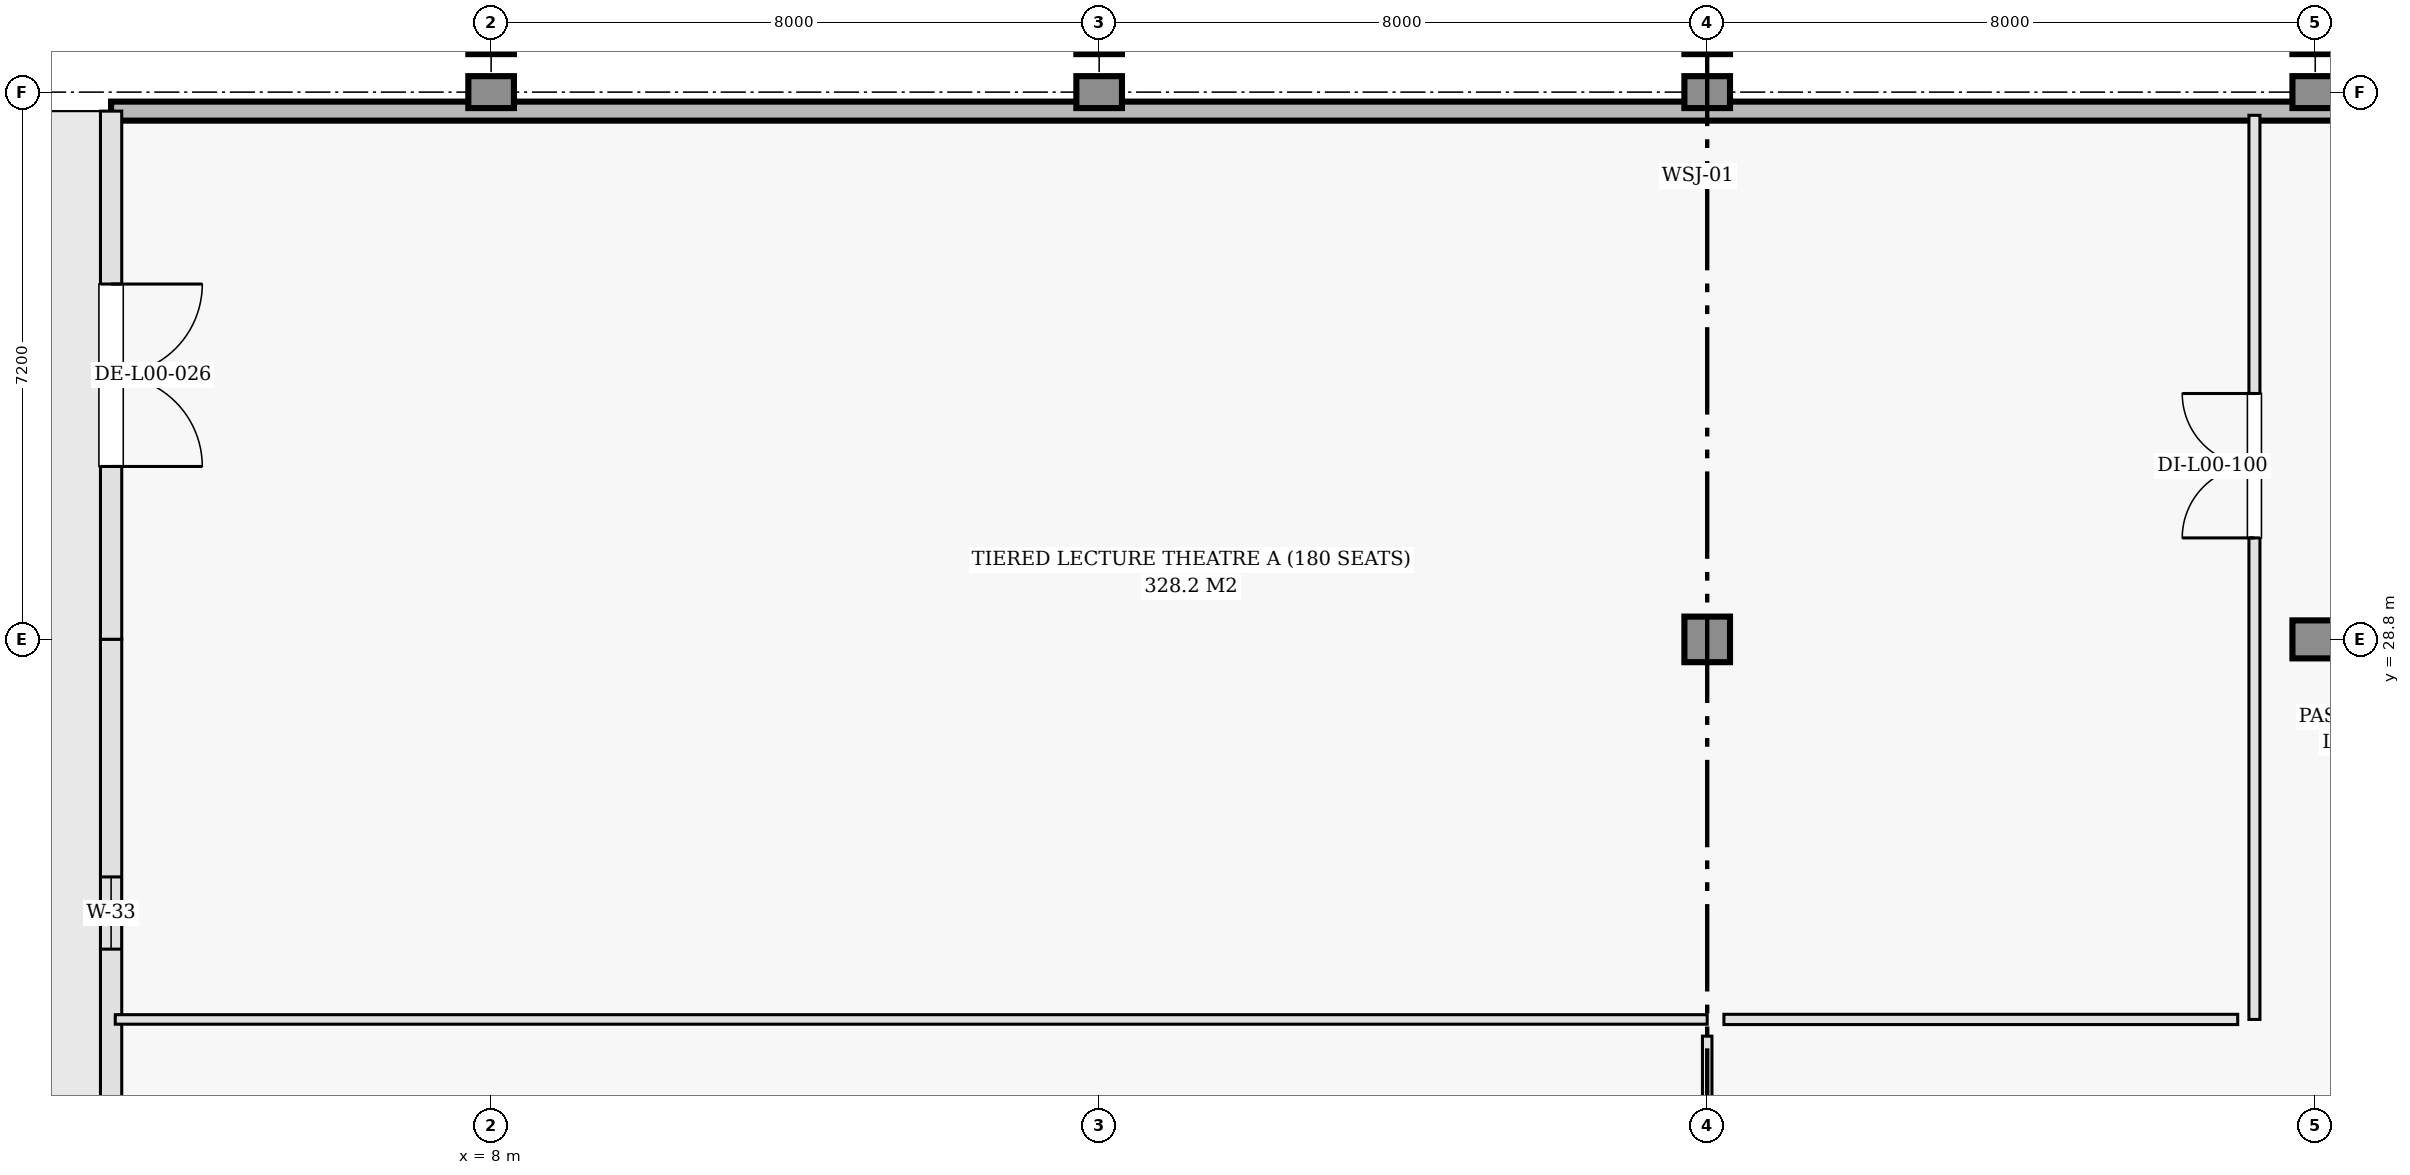
"""IFC4 building model, lengths in metres.
Left out: names, types, materials, properties, quantities, classifications, styles, units other than length and angle.
Written with IfcOpenShell. Run it as: python <this file> out.ifc"""

import sys

from ifc_helpers import new_model, si_unit, direction, frame, frame_2d, origin, origin_2d, place, context, subcontext, project, spatial, rectangle, extrude, element, fill, save


model = new_model("IFC4")
c1 = context("Model", 3, precision=1e-05, world=origin(), true_north=direction((0.0, 1.0)))
c2 = subcontext(c1, "Body", "Model", "MODEL_VIEW")
j1 = project(units=[si_unit("LENGTHUNIT", "METRE"), si_unit("PLANEANGLEUNIT", "RADIAN")], contexts=[c1])
p1 = place(None, origin())
s1 = spatial("IfcSite", under=j1, at=p1, CompositionType="ELEMENT")
p2 = place(p1, origin())
s2 = spatial("IfcBuilding", under=s1, at=p2, CompositionType="ELEMENT")
p3 = place(p2, origin())
s3 = spatial("IfcBuildingStorey", under=s2, at=p3, CompositionType="ELEMENT", Elevation=0.0)
for number, where, z_axis, x_axis in (
    (1, (8.0, 36.0, 0.0), (0.0, 0.0, 1.0), (1.0, 0.0, 0.0)),
    (2, (16.0, 36.0, 0.0), (0.0, 0.0, 1.0), (1.0, 0.0, 0.0)),
):
    element("IfcColumn", number, at=place(p3, frame(where, z_axis=z_axis, x_axis=x_axis)), inside=s3, PredefinedType="COLUMN", context=c2, shape_type="SweptSolid", body=[
        extrude(rectangle(XDim=0.42, YDim=0.42, at=origin_2d()), origin(), (0.0, 0.0, 1.0), 4.8),
    ])
p4 = place(p3, frame((24.0, 28.8, 0.0), z_axis=(0.0, 0.0, 1.0), x_axis=(1.0, 0.0, 0.0)))
e3 = element("IfcColumn", 3, at=p4, inside=s3, PredefinedType="COLUMN", context=c2, shape_type="SweptSolid", body=[
    extrude(rectangle(XDim=0.6, YDim=0.6, at=origin_2d()), origin(), (0.0, 0.0, 1.0), 4.8),
])
p5 = place(p3, frame((24.0, 36.0, 0.0), z_axis=(0.0, 0.0, 1.0), x_axis=(1.0, 0.0, 0.0)))
e4 = element("IfcColumn", 4, at=p5, inside=s3, PredefinedType="COLUMN", context=c2, shape_type="SweptSolid", body=[
    extrude(rectangle(XDim=0.42, YDim=0.42, at=origin_2d()), origin(), (0.0, 0.0, 1.0), 4.8),
])
p6 = place(p3, frame((32.0, 28.8, 0.0), z_axis=(0.0, 0.0, 1.0), x_axis=(1.0, 0.0, 0.0)))
e5 = element("IfcColumn", 5, at=p6, inside=s3, PredefinedType="COLUMN", context=c2, shape_type="SweptSolid", body=[
    extrude(rectangle(XDim=0.5, YDim=0.5, at=origin_2d()), origin(), (0.0, 0.0, 1.0), 4.8),
])
p7 = place(p3, frame((32.0, 36.0, 0.0), z_axis=(0.0, 0.0, 1.0), x_axis=(1.0, 0.0, 0.0)))
e6 = element("IfcColumn", 6, at=p7, inside=s3, PredefinedType="COLUMN", context=c2, shape_type="SweptSolid", body=[
    extrude(rectangle(XDim=0.42, YDim=0.42, at=origin_2d()), origin(), (0.0, 0.0, 1.0), 4.8),
])
for number, where, z_axis, x_axis in (
    (7, (8.0, 36.75, 0.0), (0.0, 0.0, 1.0), (1.0, 0.0, 0.0)),
    (8, (16.0, 36.75, 0.0), (0.0, 0.0, 1.0), (1.0, 0.0, 0.0)),
    (9, (24.0, 36.75, 0.0), (0.0, 0.0, 1.0), (1.0, 0.0, 0.0)),
    (10, (32.0, 36.75, 0.0), (0.0, 0.0, 1.0), (1.0, 0.0, 0.0)),
):
    element("IfcColumn", number, at=place(p3, frame(where, z_axis=z_axis, x_axis=x_axis)), inside=s3, PredefinedType="COLUMN", context=c2, shape_type="SweptSolid", body=[
        extrude(rectangle(XDim=0.5, YDim=0.5, at=origin_2d()), origin(), (0.0, 0.0, 1.0), 4.8),
    ])
p8 = place(p3, frame((44.75, 35.75, 0.0), z_axis=(0.0, 0.0, 1.0), x_axis=(-1.0, 0.0, 0.0)))
e11 = element("IfcWall", 11, at=p8, inside=s3, PredefinedType="SHEAR", context=c2, shape_type="SweptSolid", body=[
    extrude(rectangle(XDim=41.75, YDim=0.25, at=frame_2d((20.875, 0.0))), origin(), (0.0, 0.0, 1.0), 4.52),
])
p9 = place(p3, frame((3.0, 35.75, 0.0), z_axis=(0.0, 0.0, 1.0), x_axis=(0.0, -1.0, 0.0)))
e12 = element("IfcWall", 12, at=p9, inside=s3, PredefinedType="SOLIDWALL", context=c2, shape_type="SweptSolid", body=[
    extrude(rectangle(XDim=6.95, YDim=0.28, at=frame_2d((3.475, 0.0))), origin(), (0.0, 0.0, 1.0), 3.105),
])
p10 = place(p9, frame((2.275, 0.0, 0.0)))
e13 = element("IfcOpeningElement", 13, at=p10, cuts=e12, PredefinedType="OPENING", context=c2, shape_type="SweptSolid", body=[
    extrude(rectangle(XDim=2.4, YDim=2.4, at=frame_2d((1.2, 1.2))), frame((0.0, 0.15, 0.0), z_axis=(0.0, -1.0, 0.0), x_axis=(1.0, 0.0, 0.0)), (0.0, 0.0, 1.0), 0.3),
])
p11 = place(p3, frame((3.0, 28.8, 0.0), z_axis=(0.0, 0.0, 1.0), x_axis=(0.0, -1.0, 0.0)))
e14 = element("IfcWall", 14, at=p11, inside=s3, PredefinedType="SOLIDWALL", context=c2, shape_type="SweptSolid", body=[
    extrude(rectangle(XDim=7.2, YDim=0.28, at=frame_2d((3.6, 0.0))), origin(), (0.0, 0.0, 1.0), 3.105),
])
p12 = place(p11, frame((3.125, 0.0, 1.885)))
e15 = element("IfcOpeningElement", 15, at=p12, cuts=e14, PredefinedType="OPENING", context=c2, shape_type="SweptSolid", body=[
    extrude(rectangle(XDim=0.95, YDim=1.0, at=frame_2d((0.475, 0.5))), frame((0.0, 0.15, 0.0), z_axis=(0.0, -1.0, 0.0), x_axis=(1.0, 0.0, 0.0)), (0.0, 0.0, 1.0), 0.3),
])
p13 = place(p3, frame((3.055, 23.8, 0.0), z_axis=(0.0, 0.0, 1.0), x_axis=(1.0, 0.0, 0.0)))
e16 = element("IfcWall", 16, at=p13, inside=s3, PredefinedType="PARTITIONING", context=c2, shape_type="SweptSolid", body=[
    extrude(rectangle(XDim=20.945, YDim=0.125, at=frame_2d((10.473, 0.0))), origin(), (0.0, 0.0, 1.0), 3.955),
])
p14 = place(p3, frame((31.2, 23.8, 0.0), z_axis=(0.0, 0.0, 1.0), x_axis=(0.0, 1.0, 0.0)))
e17 = element("IfcWall", 17, at=p14, inside=s3, PredefinedType="PARTITIONING", context=c2, shape_type="SweptSolid", body=[
    extrude(rectangle(XDim=11.895, YDim=0.145, at=frame_2d((5.948, 0.0))), origin(), (0.0, 0.0, 1.0), 3.905),
])
p15 = place(p14, frame((6.335, 0.0, 0.0)))
e18 = element("IfcOpeningElement", 18, at=p15, cuts=e17, PredefinedType="OPENING", context=c2, shape_type="SweptSolid", body=[
    extrude(rectangle(XDim=1.9, YDim=2.25, at=frame_2d((0.95, 1.125))), frame((0.0, 0.083, 0.0), z_axis=(0.0, -1.0, 0.0), x_axis=(1.0, 0.0, 0.0)), (0.0, 0.0, 1.0), 0.165),
])
p16 = place(p3, frame((24.22, 23.8, 0.0), z_axis=(0.0, 0.0, 1.0), x_axis=(1.0, 0.0, 0.0)))
e19 = element("IfcWall", 19, at=p16, inside=s3, PredefinedType="PARTITIONING", context=c2, shape_type="SweptSolid", body=[
    extrude(rectangle(XDim=6.76, YDim=0.135, at=frame_2d((3.38, 0.0))), origin(), (0.0, 0.0, 1.0), 4.52),
])
p17 = place(p3, frame((24.0, 18.614, 0.0), z_axis=(0.0, 0.0, 1.0), x_axis=(0.0, 1.0, 0.0)))
e20 = element("IfcWall", 20, at=p17, inside=s3, PredefinedType="PARTITIONING", context=c2, shape_type="SweptSolid", body=[
    extrude(rectangle(XDim=4.966, YDim=0.125, at=frame_2d((2.483, 0.0))), origin(), (0.0, 0.0, 1.0), 3.955),
])
p18 = place(p10, origin())
e21 = element("IfcDoor", 21, at=p18, inside=s3, OperationType="DOUBLE_DOOR_SINGLE_SWING", PredefinedType="DOOR", context=c2, shape_type="SweptSolid", body=[
    extrude(rectangle(XDim=2.4, YDim=2.4, at=frame_2d((1.2, 1.2))), frame((0.0, 0.025, 0.0), z_axis=(0.0, -1.0, 0.0), x_axis=(1.0, 0.0, 0.0)), (0.0, 0.0, 1.0), 0.05),
])
fill(e13, e21)
p19 = place(p12, origin())
e22 = element("IfcWindow", 22, at=p19, inside=s3, PartitioningType="DOUBLE_PANEL_VERTICAL", PredefinedType="WINDOW", context=c2, shape_type="SweptSolid", body=[
    extrude(rectangle(XDim=0.95, YDim=1.0, at=frame_2d((0.475, 0.5))), frame((0.0, 0.03, 0.0), z_axis=(0.0, -1.0, 0.0), x_axis=(1.0, 0.0, 0.0)), (0.0, 0.0, 1.0), 0.06),
])
fill(e15, e22)
p20 = place(p15, origin())
e23 = element("IfcDoor", 23, at=p20, inside=s3, OperationType="DOUBLE_DOOR_SINGLE_SWING", PredefinedType="DOOR", context=c2, shape_type="SweptSolid", body=[
    extrude(rectangle(XDim=1.9, YDim=2.25, at=frame_2d((0.95, 1.125))), frame((0.0, 0.025, 0.0), z_axis=(0.0, -1.0, 0.0), x_axis=(1.0, 0.0, 0.0)), (0.0, 0.0, 1.0), 0.05),
])
fill(e18, e23)
save(model, sys.argv[1])
